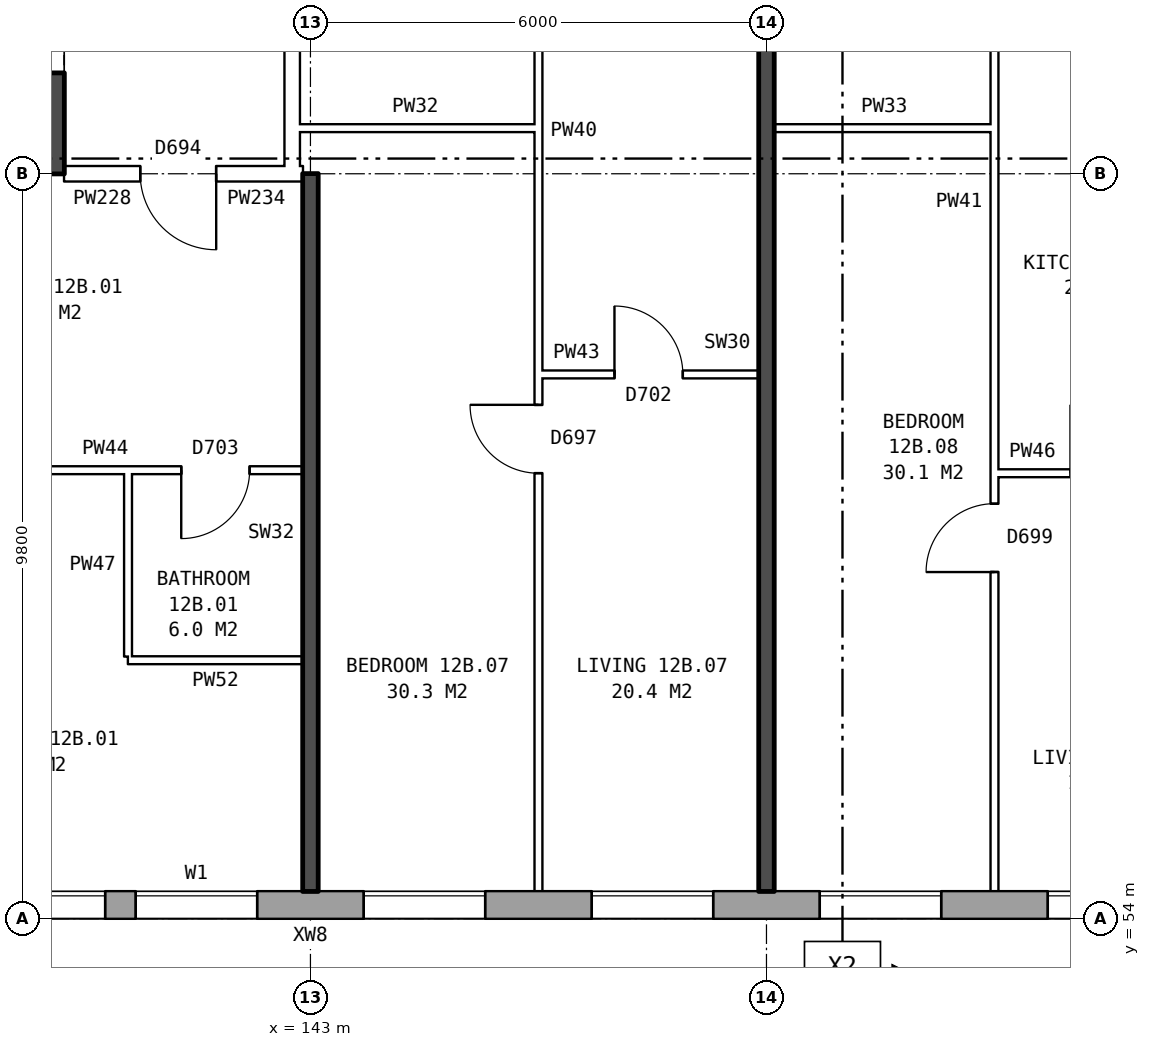
"""IFC4 building model, lengths in metres.
Left out: names, types, materials, properties, quantities, classifications, styles, units other than length and angle.
Written with IfcOpenShell. Run it as: python <this file> out.ifc"""

import sys

from ifc_helpers import new_model, si_unit, direction, frame, frame_2d, origin, place, context, subcontext, project, spatial, rectangle, extrude, element, fill, save


model = new_model("IFC4")
c1 = context("Model", 3, precision=1e-05, world=origin(), true_north=direction((0.0, 1.0)))
c2 = subcontext(c1, "Body", "Model", "MODEL_VIEW")
j1 = project(units=[si_unit("LENGTHUNIT", "METRE"), si_unit("PLANEANGLEUNIT", "RADIAN")], contexts=[c1])
p1 = place(None, origin())
s1 = spatial("IfcSite", under=j1, at=p1, CompositionType="ELEMENT")
p2 = place(p1, origin())
s2 = spatial("IfcBuilding", under=s1, at=p2, CompositionType="ELEMENT")
p3 = place(p2, frame((0.0, 0.0, 47.4)))
s3 = spatial("IfcBuildingStorey", under=s2, at=p3, CompositionType="ELEMENT", Elevation=47.4)
p4 = place(p3, frame((134.075, 54.18, 0.0), z_axis=(0.0, 0.0, 1.0), x_axis=(1.0, 0.0, 0.0)))
e1 = element("IfcWall", 1, at=p4, inside=s3, PredefinedType="STANDARD", context=c2, shape_type="SweptSolid", body=[
    extrude(rectangle(XDim=39.351, YDim=0.36, at=frame_2d((19.675, 0.0))), origin(), (0.0, 0.0, 1.0), 2.85),
])
p5 = place(p4, frame((0.3, 0.0, 0.8)))
e2 = element("IfcOpeningElement", 2, at=p5, cuts=e1, PredefinedType="OPENING", context=c2, shape_type="SweptSolid", body=[
    extrude(rectangle(XDim=1.2, YDim=1.8, at=frame_2d((0.6, 0.9))), frame((0.0, 0.19, 0.0), z_axis=(0.0, -1.0, 0.0), x_axis=(1.0, 0.0, 0.0)), (0.0, 0.0, 1.0), 0.38),
])
p6 = place(p4, frame((3.925, 0.0, 0.8)))
e3 = element("IfcOpeningElement", 3, at=p6, cuts=e1, PredefinedType="OPENING", context=c2, shape_type="SweptSolid", body=[
    extrude(rectangle(XDim=0.8, YDim=0.9, at=frame_2d((0.4, 0.45))), frame((0.0, 0.19, 0.0), z_axis=(0.0, -1.0, 0.0), x_axis=(1.0, 0.0, 0.0)), (0.0, 0.0, 1.0), 0.38),
])
p7 = place(p4, frame((6.625, 0.0, 0.8)))
e4 = element("IfcOpeningElement", 4, at=p7, cuts=e1, PredefinedType="OPENING", context=c2, shape_type="SweptSolid", body=[
    extrude(rectangle(XDim=1.6, YDim=1.8, at=frame_2d((0.8, 0.9))), frame((0.0, 0.19, 0.0), z_axis=(0.0, -1.0, 0.0), x_axis=(1.0, 0.0, 0.0)), (0.0, 0.0, 1.0), 0.38),
])
p8 = place(p4, frame((9.625, 0.0, 0.8)))
e5 = element("IfcOpeningElement", 5, at=p8, cuts=e1, PredefinedType="OPENING", context=c2, shape_type="SweptSolid", body=[
    extrude(rectangle(XDim=1.6, YDim=1.8, at=frame_2d((0.8, 0.9))), frame((0.0, 0.19, 0.0), z_axis=(0.0, -1.0, 0.0), x_axis=(1.0, 0.0, 0.0)), (0.0, 0.0, 1.0), 0.38),
])
p9 = place(p4, frame((12.625, 0.0, 0.8)))
e6 = element("IfcOpeningElement", 6, at=p9, cuts=e1, PredefinedType="OPENING", context=c2, shape_type="SweptSolid", body=[
    extrude(rectangle(XDim=1.6, YDim=1.8, at=frame_2d((0.8, 0.9))), frame((0.0, 0.19, 0.0), z_axis=(0.0, -1.0, 0.0), x_axis=(1.0, 0.0, 0.0)), (0.0, 0.0, 1.0), 0.38),
])
p10 = place(p4, frame((15.625, 0.0, 0.8)))
e7 = element("IfcOpeningElement", 7, at=p10, cuts=e1, PredefinedType="OPENING", context=c2, shape_type="SweptSolid", body=[
    extrude(rectangle(XDim=1.6, YDim=1.8, at=frame_2d((0.8, 0.9))), frame((0.0, 0.19, 0.0), z_axis=(0.0, -1.0, 0.0), x_axis=(1.0, 0.0, 0.0)), (0.0, 0.0, 1.0), 0.38),
])
p11 = place(p4, frame((18.625, 0.0, 0.8)))
e8 = element("IfcOpeningElement", 8, at=p11, cuts=e1, PredefinedType="OPENING", context=c2, shape_type="SweptSolid", body=[
    extrude(rectangle(XDim=1.6, YDim=1.8, at=frame_2d((0.8, 0.9))), frame((0.0, 0.19, 0.0), z_axis=(0.0, -1.0, 0.0), x_axis=(1.0, 0.0, 0.0)), (0.0, 0.0, 1.0), 0.38),
])
p12 = place(p4, frame((21.625, 0.0, 0.8)))
e9 = element("IfcOpeningElement", 9, at=p12, cuts=e1, PredefinedType="OPENING", context=c2, shape_type="SweptSolid", body=[
    extrude(rectangle(XDim=1.6, YDim=1.8, at=frame_2d((0.8, 0.9))), frame((0.0, 0.19, 0.0), z_axis=(0.0, -1.0, 0.0), x_axis=(1.0, 0.0, 0.0)), (0.0, 0.0, 1.0), 0.38),
])
p13 = place(p4, frame((24.625, 0.0, 0.8)))
e10 = element("IfcOpeningElement", 10, at=p13, cuts=e1, PredefinedType="OPENING", context=c2, shape_type="SweptSolid", body=[
    extrude(rectangle(XDim=1.6, YDim=1.8, at=frame_2d((0.8, 0.9))), frame((0.0, 0.19, 0.0), z_axis=(0.0, -1.0, 0.0), x_axis=(1.0, 0.0, 0.0)), (0.0, 0.0, 1.0), 0.38),
])
p14 = place(p4, frame((27.625, 0.0, 0.8)))
e11 = element("IfcOpeningElement", 11, at=p14, cuts=e1, PredefinedType="OPENING", context=c2, shape_type="SweptSolid", body=[
    extrude(rectangle(XDim=1.6, YDim=1.8, at=frame_2d((0.8, 0.9))), frame((0.0, 0.19, 0.0), z_axis=(0.0, -1.0, 0.0), x_axis=(1.0, 0.0, 0.0)), (0.0, 0.0, 1.0), 0.38),
])
p15 = place(p4, frame((30.625, 0.0, 0.8)))
e12 = element("IfcOpeningElement", 12, at=p15, cuts=e1, PredefinedType="OPENING", context=c2, shape_type="SweptSolid", body=[
    extrude(rectangle(XDim=1.6, YDim=1.8, at=frame_2d((0.8, 0.9))), frame((0.0, 0.19, 0.0), z_axis=(0.0, -1.0, 0.0), x_axis=(1.0, 0.0, 0.0)), (0.0, 0.0, 1.0), 0.38),
])
p16 = place(p4, frame((33.125, 0.0, 0.8)))
e13 = element("IfcOpeningElement", 13, at=p16, cuts=e1, PredefinedType="OPENING", context=c2, shape_type="SweptSolid", body=[
    extrude(rectangle(XDim=1.2, YDim=1.8, at=frame_2d((0.6, 0.9))), frame((0.0, 0.19, 0.0), z_axis=(0.0, -1.0, 0.0), x_axis=(1.0, 0.0, 0.0)), (0.0, 0.0, 1.0), 0.38),
])
p17 = place(p4, frame((34.625, 0.0, 0.8)))
e14 = element("IfcOpeningElement", 14, at=p17, cuts=e1, PredefinedType="OPENING", context=c2, shape_type="SweptSolid", body=[
    extrude(rectangle(XDim=0.8, YDim=0.9, at=frame_2d((0.4, 0.45))), frame((0.0, 0.19, 0.0), z_axis=(0.0, -1.0, 0.0), x_axis=(1.0, 0.0, 0.0)), (0.0, 0.0, 1.0), 0.38),
])
p18 = place(p4, frame((1.8, 0.0, 1.6)))
e15 = element("IfcOpeningElement", 15, at=p18, cuts=e1, PredefinedType="OPENING", context=c2, shape_type="SweptSolid", body=[
    extrude(rectangle(XDim=0.8, YDim=0.9, at=frame_2d((0.4, 0.45))), frame((0.0, 0.19, 0.0), z_axis=(0.0, -1.0, 0.0), x_axis=(1.0, 0.0, 0.0)), (0.0, 0.0, 1.0), 0.38),
])
p19 = place(p4, frame((5.025, 0.0, 0.8)))
e16 = element("IfcOpeningElement", 16, at=p19, cuts=e1, PredefinedType="OPENING", context=c2, shape_type="SweptSolid", body=[
    extrude(rectangle(XDim=1.2, YDim=1.8, at=frame_2d((0.6, 0.9))), frame((0.0, 0.19, 0.0), z_axis=(0.0, -1.0, 0.0), x_axis=(1.0, 0.0, 0.0)), (0.0, 0.0, 1.0), 0.38),
])
p20 = place(p4, frame((36.625, 0.0, 1.7)))
e17 = element("IfcOpeningElement", 17, at=p20, cuts=e1, PredefinedType="OPENING", context=c2, shape_type="SweptSolid", body=[
    extrude(rectangle(XDim=0.8, YDim=0.9, at=frame_2d((0.4, 0.45))), frame((0.0, 0.19, 0.0), z_axis=(0.0, -1.0, 0.0), x_axis=(1.0, 0.0, 0.0)), (0.0, 0.0, 1.0), 0.38),
])
p21 = place(p4, frame((37.725, 0.0, 0.8)))
e18 = element("IfcOpeningElement", 18, at=p21, cuts=e1, PredefinedType="OPENING", context=c2, shape_type="SweptSolid", body=[
    extrude(rectangle(XDim=1.0, YDim=1.8, at=frame_2d((0.5, 0.9))), frame((0.0, 0.19, 0.0), z_axis=(0.0, -1.0, 0.0), x_axis=(1.0, 0.0, 0.0)), (0.0, 0.0, 1.0), 0.38),
])
p22 = place(p3, frame((139.36, 64.6, 0.0), z_axis=(0.0, 0.0, 1.0), x_axis=(0.0, 1.0, 0.0)))
e19 = element("IfcWall", 19, at=p22, inside=s3, PredefinedType="SHEAR", context=c2, shape_type="SweptSolid", body=[
    extrude(rectangle(XDim=10.8, YDim=0.8, at=frame_2d((5.4, 0.0))), origin(), (0.0, 0.0, 1.0), 2.85),
])
p23 = place(p22, frame((0.525, 0.0, 0.0)))
e20 = element("IfcOpeningElement", 20, at=p23, cuts=e19, PredefinedType="OPENING", context=c2, shape_type="SweptSolid", body=[
    extrude(rectangle(XDim=1.1, YDim=2.1, at=frame_2d((0.55, 1.05))), frame((0.0, 0.41, 0.0), z_axis=(0.0, -1.0, 0.0), x_axis=(1.0, 0.0, 0.0)), (0.0, 0.0, 1.0), 0.82),
])
p24 = place(p22, frame((9.1, 0.0, 0.0)))
e21 = element("IfcOpeningElement", 21, at=p24, cuts=e19, PredefinedType="OPENING", context=c2, shape_type="SweptSolid", body=[
    extrude(rectangle(XDim=1.1, YDim=2.1, at=frame_2d((0.55, 1.05))), frame((0.0, 0.41, 0.0), z_axis=(0.0, -1.0, 0.0), x_axis=(1.0, 0.0, 0.0)), (0.0, 0.0, 1.0), 0.82),
])
p25 = place(p22, frame((7.325, 0.0, 0.0)))
e22 = element("IfcOpeningElement", 22, at=p25, cuts=e19, PredefinedType="OPENING", context=c2, shape_type="SweptSolid", body=[
    extrude(rectangle(XDim=0.85, YDim=2.1, at=frame_2d((0.425, 1.05))), frame((0.0, 0.41, 0.0), z_axis=(0.0, -1.0, 0.0), x_axis=(1.0, 0.0, 0.0)), (0.0, 0.0, 1.0), 0.82),
])
p26 = place(p3, frame((139.76, 64.2, 0.0), z_axis=(0.0, 0.0, 1.0), x_axis=(-1.0, 0.0, 0.0)))
e23 = element("IfcWall", 23, at=p26, inside=s3, PredefinedType="SHEAR", context=c2, shape_type="SweptSolid", body=[
    extrude(rectangle(XDim=8.4, YDim=0.8, at=frame_2d((4.2, 0.0))), origin(), (0.0, 0.0, 1.0), 2.85),
])
p27 = place(p3, frame((142.76, 63.9, 0.0), z_axis=(0.0, 0.0, 1.0), x_axis=(0.0, 1.0, 0.0)))
e24 = element("IfcWall", 24, at=p27, inside=s3, PredefinedType="PARTITIONING", context=c2, shape_type="SweptSolid", body=[
    extrude(rectangle(XDim=12.2, YDim=0.2, at=frame_2d((6.1, 0.0))), origin(), (0.0, 0.0, 1.0), 2.85),
])
p28 = place(p27, frame((5.1, 0.0, 0.0)))
e25 = element("IfcOpeningElement", 25, at=p28, cuts=e24, PredefinedType="OPENING", context=c2, shape_type="SweptSolid", body=[
    extrude(rectangle(XDim=2.0, YDim=2.1, at=frame_2d((1.0, 1.05))), frame((0.0, 0.11, 0.0), z_axis=(0.0, -1.0, 0.0), x_axis=(1.0, 0.0, 0.0)), (0.0, 0.0, 1.0), 0.22),
])
p29 = place(p3, frame((140.6, 57.4, 0.0), z_axis=(0.0, 0.0, 1.0), x_axis=(1.0, 0.0, 0.0)))
e26 = element("IfcWall", 26, at=p29, inside=s3, PredefinedType="PARTITIONING", context=c2, shape_type="SweptSolid", body=[
    extrude(rectangle(XDim=2.3, YDim=0.1, at=frame_2d((1.15, 0.0))), origin(), (0.0, 0.0, 1.0), 2.85),
])
p30 = place(p3, frame((152.0, 59.86, 0.0), z_axis=(0.0, 0.0, 1.0), x_axis=(1.0, 0.0, 0.0)))
e27 = element("IfcWall", 27, at=p30, inside=s3, PredefinedType="PARTITIONING", context=c2, shape_type="SweptSolid", body=[
    extrude(rectangle(XDim=2.9, YDim=0.1, at=frame_2d((1.45, 0.0))), origin(), (0.0, 0.0, 1.0), 2.85),
])
p31 = place(p30, frame((1.0, 0.0, 0.0)))
e28 = element("IfcOpeningElement", 28, at=p31, cuts=e27, PredefinedType="OPENING", context=c2, shape_type="SweptSolid", body=[
    extrude(rectangle(XDim=0.9, YDim=2.1, at=frame_2d((0.45, 1.05))), frame((0.0, 0.06, 0.0), z_axis=(0.0, -1.0, 0.0), x_axis=(1.0, 0.0, 0.0)), (0.0, 0.0, 1.0), 0.12),
])
p32 = place(p3, frame((137.1, 59.9, 0.0), z_axis=(0.0, 0.0, 1.0), x_axis=(1.0, 0.0, 0.0)))
e29 = element("IfcWall", 29, at=p32, inside=s3, PredefinedType="PARTITIONING", context=c2, shape_type="SweptSolid", body=[
    extrude(rectangle(XDim=5.8, YDim=0.1, at=frame_2d((2.9, 0.0))), origin(), (0.0, 0.0, 1.0), 2.85),
])
p33 = place(p32, frame((1.3, 0.0, 0.0)))
e30 = element("IfcOpeningElement", 30, at=p33, cuts=e29, PredefinedType="OPENING", context=c2, shape_type="SweptSolid", body=[
    extrude(rectangle(XDim=0.9, YDim=2.1, at=frame_2d((0.45, 1.05))), frame((0.0, 0.06, 0.0), z_axis=(0.0, -1.0, 0.0), x_axis=(1.0, 0.0, 0.0)), (0.0, 0.0, 1.0), 0.12),
])
p34 = place(p32, frame((4.2, 0.0, 0.0)))
e31 = element("IfcOpeningElement", 31, at=p34, cuts=e29, PredefinedType="OPENING", context=c2, shape_type="SweptSolid", body=[
    extrude(rectangle(XDim=0.9, YDim=2.1, at=frame_2d((0.45, 1.05))), frame((0.0, 0.06, 0.0), z_axis=(0.0, -1.0, 0.0), x_axis=(1.0, 0.0, 0.0)), (0.0, 0.0, 1.0), 0.12),
])
p35 = place(p3, frame((146.0, 61.16, 0.0), z_axis=(0.0, 0.0, 1.0), x_axis=(1.0, 0.0, 0.0)))
e32 = element("IfcWall", 32, at=p35, inside=s3, PredefinedType="PARTITIONING", context=c2, shape_type="SweptSolid", body=[
    extrude(rectangle(XDim=2.9, YDim=0.1, at=frame_2d((1.45, 0.0))), origin(), (0.0, 0.0, 1.0), 2.85),
])
p36 = place(p35, frame((1.0, 0.0, 0.0)))
e33 = element("IfcOpeningElement", 33, at=p36, cuts=e32, PredefinedType="OPENING", context=c2, shape_type="SweptSolid", body=[
    extrude(rectangle(XDim=0.9, YDim=2.1, at=frame_2d((0.45, 1.05))), frame((0.0, 0.06, 0.0), z_axis=(0.0, -1.0, 0.0), x_axis=(1.0, 0.0, 0.0)), (0.0, 0.0, 1.0), 0.12),
])
p37 = place(p3, frame((139.76, 63.8, 0.0), z_axis=(0.0, 0.0, 1.0), x_axis=(1.0, 0.0, 0.0)))
e34 = element("IfcWall", 34, at=p37, inside=s3, PredefinedType="PARTITIONING", context=c2, shape_type="SweptSolid", body=[
    extrude(rectangle(XDim=3.0, YDim=0.2, at=frame_2d((1.5, 0.0))), origin(), (0.0, 0.0, 1.0), 2.85),
])
p38 = place(p37, frame((1.0, 0.0, 0.0)))
e35 = element("IfcOpeningElement", 35, at=p38, cuts=e34, PredefinedType="OPENING", context=c2, shape_type="SweptSolid", body=[
    extrude(rectangle(XDim=1.0, YDim=2.1, at=frame_2d((0.5, 1.05))), frame((0.0, 0.11, 0.0), z_axis=(0.0, -1.0, 0.0), x_axis=(1.0, 0.0, 0.0)), (0.0, 0.0, 1.0), 0.22),
])
p39 = place(p3, frame((142.76, 63.8, 0.0), z_axis=(0.0, 0.0, 1.0), x_axis=(1.0, 0.0, 0.0)))
e36 = element("IfcWall", 36, at=p39, inside=s3, PredefinedType="PARTITIONING", context=c2, shape_type="SweptSolid", body=[
    extrude(rectangle(XDim=0.14, YDim=0.2, at=frame_2d((0.07, 0.0))), origin(), (0.0, 0.0, 1.0), 2.85),
])
p40 = place(p3, frame((142.76, 64.4, 0.0), z_axis=(0.0, 0.0, 1.0), x_axis=(1.0, 0.0, 0.0)))
e37 = element("IfcWall", 37, at=p40, inside=s3, PredefinedType="PARTITIONING", context=c2, shape_type="SweptSolid", body=[
    extrude(rectangle(XDim=3.24, YDim=0.1, at=frame_2d((1.62, 0.0))), origin(), (0.0, 0.0, 1.0), 2.85),
])
p41 = place(p3, frame((149.1, 64.4, 0.0), z_axis=(0.0, 0.0, 1.0), x_axis=(1.0, 0.0, 0.0)))
e38 = element("IfcWall", 38, at=p41, inside=s3, PredefinedType="PARTITIONING", context=c2, shape_type="SweptSolid", body=[
    extrude(rectangle(XDim=2.9, YDim=0.1, at=frame_2d((1.45, 0.0))), origin(), (0.0, 0.0, 1.0), 2.85),
])
p42 = place(p3, frame((140.6, 57.45, 0.0), z_axis=(0.0, 0.0, 1.0), x_axis=(0.0, 1.0, 0.0)))
e39 = element("IfcWall", 39, at=p42, inside=s3, PredefinedType="PARTITIONING", context=c2, shape_type="SweptSolid", body=[
    extrude(rectangle(XDim=2.4, YDim=0.1, at=frame_2d((1.2, 0.0))), origin(), (0.0, 0.0, 1.0), 2.85),
])
p43 = place(p3, frame((143.0, 54.36, 0.0), z_axis=(0.0, 0.0, 1.0), x_axis=(0.0, 1.0, 0.0)))
e40 = element("IfcWall", 40, at=p43, inside=s3, PredefinedType="SOLIDWALL", context=c2, shape_type="SweptSolid", body=[
    extrude(rectangle(XDim=9.44, YDim=0.2, at=frame_2d((4.72, 0.0))), origin(), (0.0, 0.0, 1.0), 2.85),
])
p44 = place(p3, frame((146.0, 54.36, 0.0), z_axis=(0.0, 0.0, 1.0), x_axis=(0.0, 1.0, 0.0)))
e41 = element("IfcWall", 41, at=p44, inside=s3, PredefinedType="PARTITIONING", context=c2, shape_type="SweptSolid", body=[
    extrude(rectangle(XDim=14.34, YDim=0.1, at=frame_2d((7.17, 0.0))), origin(), (0.0, 0.0, 1.0), 2.85),
])
p45 = place(p44, frame((5.5, 0.0, 0.0)))
e42 = element("IfcOpeningElement", 42, at=p45, cuts=e41, PredefinedType="OPENING", context=c2, shape_type="SweptSolid", body=[
    extrude(rectangle(XDim=0.9, YDim=2.1, at=frame_2d((0.45, 1.05))), frame((0.0, 0.06, 0.0), z_axis=(0.0, -1.0, 0.0), x_axis=(1.0, 0.0, 0.0)), (0.0, 0.0, 1.0), 0.12),
])
p46 = place(p44, frame((13.04, 0.0, 0.0)))
e43 = element("IfcOpeningElement", 43, at=p46, cuts=e41, PredefinedType="OPENING", context=c2, shape_type="SweptSolid", body=[
    extrude(rectangle(XDim=0.9, YDim=2.1, at=frame_2d((0.45, 1.05))), frame((0.0, 0.06, 0.0), z_axis=(0.0, -1.0, 0.0), x_axis=(1.0, 0.0, 0.0)), (0.0, 0.0, 1.0), 0.12),
])
p47 = place(p3, frame((149.0, 54.36, 0.0), z_axis=(0.0, 0.0, 1.0), x_axis=(0.0, 1.0, 0.0)))
e44 = element("IfcWall", 44, at=p47, inside=s3, PredefinedType="SOLIDWALL", context=c2, shape_type="SweptSolid", body=[
    extrude(rectangle(XDim=14.44, YDim=0.2, at=frame_2d((7.22, 0.0))), origin(), (0.0, 0.0, 1.0), 2.85),
])
p48 = place(p3, frame((152.0, 54.36, 0.0), z_axis=(0.0, 0.0, 1.0), x_axis=(0.0, 1.0, 0.0)))
e45 = element("IfcWall", 45, at=p48, inside=s3, PredefinedType="PARTITIONING", context=c2, shape_type="SweptSolid", body=[
    extrude(rectangle(XDim=14.34, YDim=0.1, at=frame_2d((7.17, 0.0))), origin(), (0.0, 0.0, 1.0), 2.85),
])
p49 = place(p48, frame((4.2, 0.0, 0.0)))
e46 = element("IfcOpeningElement", 46, at=p49, cuts=e45, PredefinedType="OPENING", context=c2, shape_type="SweptSolid", body=[
    extrude(rectangle(XDim=0.9, YDim=2.1, at=frame_2d((0.45, 1.05))), frame((0.0, 0.06, 0.0), z_axis=(0.0, -1.0, 0.0), x_axis=(1.0, 0.0, 0.0)), (0.0, 0.0, 1.0), 0.12),
])
p50 = place(p48, frame((13.04, 0.0, 0.0)))
e47 = element("IfcOpeningElement", 47, at=p50, cuts=e45, PredefinedType="OPENING", context=c2, shape_type="SweptSolid", body=[
    extrude(rectangle(XDim=0.9, YDim=2.1, at=frame_2d((0.45, 1.05))), frame((0.0, 0.06, 0.0), z_axis=(0.0, -1.0, 0.0), x_axis=(1.0, 0.0, 0.0)), (0.0, 0.0, 1.0), 0.12),
])
p51 = place(p7, origin())
e48 = element("IfcWindow", 48, at=p51, inside=s3, PartitioningType="SINGLE_PANEL", PredefinedType="WINDOW", context=c2, shape_type="SweptSolid", body=[
    extrude(rectangle(XDim=1.6, YDim=1.8, at=frame_2d((0.8, 0.9))), frame((0.0, 0.15, 0.0), z_axis=(0.0, -1.0, 0.0), x_axis=(1.0, 0.0, 0.0)), (0.0, 0.0, 1.0), 0.06),
])
fill(e4, e48)
p52 = place(p8, origin())
e49 = element("IfcWindow", 49, at=p52, inside=s3, PartitioningType="SINGLE_PANEL", PredefinedType="WINDOW", context=c2, shape_type="SweptSolid", body=[
    extrude(rectangle(XDim=1.6, YDim=1.8, at=frame_2d((0.8, 0.9))), frame((0.0, 0.15, 0.0), z_axis=(0.0, -1.0, 0.0), x_axis=(1.0, 0.0, 0.0)), (0.0, 0.0, 1.0), 0.06),
])
fill(e5, e49)
p53 = place(p9, origin())
e50 = element("IfcWindow", 50, at=p53, inside=s3, PartitioningType="SINGLE_PANEL", PredefinedType="WINDOW", context=c2, shape_type="SweptSolid", body=[
    extrude(rectangle(XDim=1.6, YDim=1.8, at=frame_2d((0.8, 0.9))), frame((0.0, 0.15, 0.0), z_axis=(0.0, -1.0, 0.0), x_axis=(1.0, 0.0, 0.0)), (0.0, 0.0, 1.0), 0.06),
])
fill(e6, e50)
p54 = place(p10, origin())
e51 = element("IfcWindow", 51, at=p54, inside=s3, PartitioningType="SINGLE_PANEL", PredefinedType="WINDOW", context=c2, shape_type="SweptSolid", body=[
    extrude(rectangle(XDim=1.6, YDim=1.8, at=frame_2d((0.8, 0.9))), frame((0.0, 0.15, 0.0), z_axis=(0.0, -1.0, 0.0), x_axis=(1.0, 0.0, 0.0)), (0.0, 0.0, 1.0), 0.06),
])
fill(e7, e51)
p55 = place(p11, origin())
e52 = element("IfcWindow", 52, at=p55, inside=s3, PartitioningType="SINGLE_PANEL", PredefinedType="WINDOW", context=c2, shape_type="SweptSolid", body=[
    extrude(rectangle(XDim=1.6, YDim=1.8, at=frame_2d((0.8, 0.9))), frame((0.0, 0.15, 0.0), z_axis=(0.0, -1.0, 0.0), x_axis=(1.0, 0.0, 0.0)), (0.0, 0.0, 1.0), 0.06),
])
fill(e8, e52)
p56 = place(p38, frame((1.0, 0.0, 0.0), z_axis=(0.0, 0.0, 1.0), x_axis=(-1.0, 0.0, 0.0)))
e53 = element("IfcDoor", 53, at=p56, inside=s3, OperationType="SINGLE_SWING_LEFT", PredefinedType="DOOR", context=c2, shape_type="SweptSolid", body=[
    extrude(rectangle(XDim=1.0, YDim=2.1, at=frame_2d((0.5, 1.05))), frame((0.0, 0.025, 0.0), z_axis=(0.0, -1.0, 0.0), x_axis=(1.0, 0.0, 0.0)), (0.0, 0.0, 1.0), 0.05),
])
fill(e35, e53)
p57 = place(p34, frame((0.9, 0.0, 0.0), z_axis=(0.0, 0.0, 1.0), x_axis=(-1.0, 0.0, 0.0)))
e54 = element("IfcDoor", 54, at=p57, inside=s3, OperationType="SINGLE_SWING_RIGHT", PredefinedType="DOOR", context=c2, shape_type="SweptSolid", body=[
    extrude(rectangle(XDim=0.9, YDim=2.1, at=frame_2d((0.45, 1.05))), frame((0.0, 0.025, 0.0), z_axis=(0.0, -1.0, 0.0), x_axis=(1.0, 0.0, 0.0)), (0.0, 0.0, 1.0), 0.05),
])
fill(e31, e54)
p58 = place(p45, origin())
e55 = element("IfcDoor", 55, at=p58, inside=s3, OperationType="SINGLE_SWING_RIGHT", PredefinedType="DOOR", context=c2, shape_type="SweptSolid", body=[
    extrude(rectangle(XDim=0.9, YDim=2.1, at=frame_2d((0.45, 1.05))), frame((0.0, 0.025, 0.0), z_axis=(0.0, -1.0, 0.0), x_axis=(1.0, 0.0, 0.0)), (0.0, 0.0, 1.0), 0.05),
])
fill(e42, e55)
p59 = place(p36, origin())
e56 = element("IfcDoor", 56, at=p59, inside=s3, OperationType="SINGLE_SWING_LEFT", PredefinedType="DOOR", context=c2, shape_type="SweptSolid", body=[
    extrude(rectangle(XDim=0.9, YDim=2.1, at=frame_2d((0.45, 1.05))), frame((0.0, 0.025, 0.0), z_axis=(0.0, -1.0, 0.0), x_axis=(1.0, 0.0, 0.0)), (0.0, 0.0, 1.0), 0.05),
])
fill(e33, e56)
p60 = place(p49, origin())
e57 = element("IfcDoor", 57, at=p60, inside=s3, OperationType="SINGLE_SWING_LEFT", PredefinedType="DOOR", context=c2, shape_type="SweptSolid", body=[
    extrude(rectangle(XDim=0.9, YDim=2.1, at=frame_2d((0.45, 1.05))), frame((0.0, 0.025, 0.0), z_axis=(0.0, -1.0, 0.0), x_axis=(1.0, 0.0, 0.0)), (0.0, 0.0, 1.0), 0.05),
])
fill(e46, e57)
p61 = place(p19, origin())
e58 = element("IfcWindow", 58, at=p61, inside=s3, PartitioningType="SINGLE_PANEL", PredefinedType="WINDOW", context=c2, shape_type="SweptSolid", body=[
    extrude(rectangle(XDim=1.2, YDim=1.8, at=frame_2d((0.6, 0.9))), frame((0.0, 0.15, 0.0), z_axis=(0.0, -1.0, 0.0), x_axis=(1.0, 0.0, 0.0)), (0.0, 0.0, 1.0), 0.06),
])
fill(e16, e58)
save(model, sys.argv[1])
